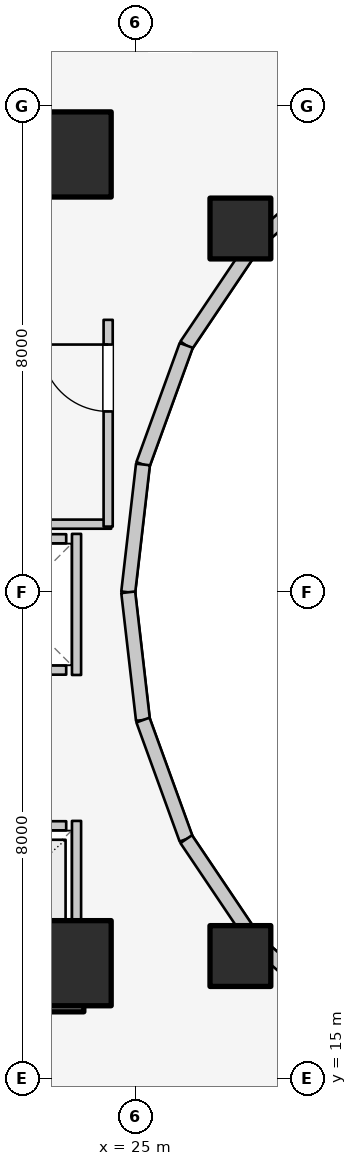
"""IFC4 building model, lengths in metres.
Left out: names, types, materials, properties, quantities, classifications, styles, units other than length and angle.
Written with IfcOpenShell. Run it as: python <this file> out.ifc"""

import sys

from ifc_helpers import new_model, si_unit, direction, frame, frame_2d, origin, origin_2d, place, context, subcontext, project, spatial, rectangle, extrude, element, fill, save


model = new_model("IFC4")
c1 = context("Model", 3, precision=1e-05, world=origin(), true_north=direction((0.0, 1.0)))
c2 = subcontext(c1, "Body", "Model", "MODEL_VIEW")
j1 = project(units=[si_unit("LENGTHUNIT", "METRE"), si_unit("PLANEANGLEUNIT", "RADIAN")], contexts=[c1])
p1 = place(None, origin())
s1 = spatial("IfcSite", under=j1, at=p1, CompositionType="ELEMENT")
p2 = place(p1, origin())
s2 = spatial("IfcBuilding", under=s1, at=p2, CompositionType="ELEMENT")
p3 = place(p2, frame((0.0, 0.0, 43.1)))
s3 = spatial("IfcBuildingStorey", under=s2, at=p3, CompositionType="ELEMENT", Elevation=43.1)
for number, where, z_axis, x_axis in (
    (1, (19.65, 16.55, 0.0), (0.0, 0.0, 1.0), (1.0, 0.0, 0.0)),
    (2, (19.65, 30.35, 0.0), (0.0, 0.0, 1.0), (1.0, 0.0, 0.0)),
):
    element("IfcWall", number, at=place(p3, frame(where, z_axis=z_axis, x_axis=x_axis)), inside=s3, PredefinedType="SHEAR", context=c2, shape_type="SweptSolid", body=[
        extrude(rectangle(XDim=4.5, YDim=0.9, at=frame_2d((2.25, 0.0))), origin(), (0.0, 0.0, 1.0), 3.1),
    ])
for number, where, z_axis, x_axis in (
    (3, (23.9, 16.9, 0.0), (0.0, 0.0, 1.0), (1.0, 0.0, 0.0)),
    (4, (23.9, 30.2, 0.0), (0.0, 0.0, 1.0), (1.0, 0.0, 0.0)),
):
    element("IfcColumn", number, at=place(p3, frame(where, z_axis=z_axis, x_axis=x_axis)), inside=s3, PredefinedType="COLUMN", context=c2, shape_type="SweptSolid", body=[
        extrude(rectangle(XDim=1.4, YDim=1.4, at=origin_2d()), origin(), (0.0, 0.0, 1.0), 3.1),
    ])
for number, where, z_axis, x_axis in (
    (5, (26.725, 28.982, 0.0), (0.0, 0.0, 1.0), (1.0, 0.0, 0.0)),
    (6, (26.725, 17.018, 0.0), (0.0, 0.0, 1.0), (1.0, 0.0, 0.0)),
):
    element("IfcColumn", number, at=place(p3, frame(where, z_axis=z_axis, x_axis=x_axis)), inside=s3, PredefinedType="COLUMN", context=c2, shape_type="SweptSolid", body=[
        extrude(rectangle(XDim=1.0, YDim=1.0, at=origin_2d()), origin(), (0.0, 0.0, 1.0), 3.1),
    ])
p4 = place(p3, frame((28.44, 30.032, 0.0), z_axis=(0.0, 0.0, 1.0), x_axis=(-0.752576694707, -0.658504607869, 0.0)))
e7 = element("IfcWall", 7, at=p4, inside=s3, PredefinedType="STANDARD", context=c2, shape_type="SweptSolid", body=[
    extrude(rectangle(XDim=1.959, YDim=0.23, at=frame_2d((0.98, 0.0))), origin(), (0.0, 0.0, 1.0), 1.22),
])
p5 = place(p3, frame((26.965, 28.742, 0.0), z_axis=(0.0, 0.0, 1.0), x_axis=(-0.558197800898, -0.829707909492, 0.0)))
e8 = element("IfcWall", 8, at=p5, inside=s3, PredefinedType="STANDARD", context=c2, shape_type="SweptSolid", body=[
    extrude(rectangle(XDim=2.027, YDim=0.23, at=frame_2d((1.013, 0.0))), origin(), (0.0, 0.0, 1.0), 1.22),
])
p6 = place(p3, frame((25.834, 27.06, 0.0), z_axis=(0.0, 0.0, 1.0), x_axis=(-0.341423187295, -0.93990968033, 0.0)))
e9 = element("IfcWall", 9, at=p6, inside=s3, PredefinedType="STANDARD", context=c2, shape_type="SweptSolid", body=[
    extrude(rectangle(XDim=2.084, YDim=0.23, at=frame_2d((1.042, 0.0))), origin(), (0.0, 0.0, 1.0), 2.56),
])
for number, where, z_axis, x_axis in (
    (10, (25.123, 25.102, 0.0), (0.0, 0.0, 1.0), (-0.115, -0.993, 0.0)),
    (11, (24.88, 23.0, 0.0), (0.0, 0.0, 1.0), (0.115, -0.993, 0.0)),
):
    element("IfcWall", number, at=place(p3, frame(where, z_axis=z_axis, x_axis=x_axis)), inside=s3, PredefinedType="STANDARD", context=c2, shape_type="SweptSolid", body=[
        extrude(rectangle(XDim=2.115, YDim=0.23, at=frame_2d((1.058, 0.0))), origin(), (0.0, 0.0, 1.0), 2.56),
    ])
p7 = place(p3, frame((25.123, 20.898, 0.0), z_axis=(0.0, 0.0, 1.0), x_axis=(0.341423187295, -0.93990968033, 0.0)))
e12 = element("IfcWall", 12, at=p7, inside=s3, PredefinedType="STANDARD", context=c2, shape_type="SweptSolid", body=[
    extrude(rectangle(XDim=2.084, YDim=0.23, at=frame_2d((1.042, 0.0))), origin(), (0.0, 0.0, 1.0), 2.56),
])
p8 = place(p3, frame((25.834, 18.94, 0.0), z_axis=(0.0, 0.0, 1.0), x_axis=(0.558197800898, -0.829707909492, 0.0)))
e13 = element("IfcWall", 13, at=p8, inside=s3, PredefinedType="STANDARD", context=c2, shape_type="SweptSolid", body=[
    extrude(rectangle(XDim=2.027, YDim=0.23, at=frame_2d((1.013, 0.0))), origin(), (0.0, 0.0, 1.0), 1.22),
])
p9 = place(p3, frame((26.965, 17.258, 0.0), z_axis=(0.0, 0.0, 1.0), x_axis=(0.752576694707, -0.658504607869, 0.0)))
e14 = element("IfcWall", 14, at=p9, inside=s3, PredefinedType="STANDARD", context=c2, shape_type="SweptSolid", body=[
    extrude(rectangle(XDim=1.959, YDim=0.23, at=frame_2d((0.98, 0.0))), origin(), (0.0, 0.0, 1.0), 1.22),
])
p10 = place(p3, frame((22.04, 19.16, 0.0), z_axis=(0.0, 0.0, 1.0), x_axis=(1.0, 0.0, 0.0)))
e15 = element("IfcWall", 15, at=p10, inside=s3, PredefinedType="SOLIDWALL", context=c2, shape_type="SweptSolid", body=[
    extrude(rectangle(XDim=1.82, YDim=0.15, at=frame_2d((0.91, 0.0))), origin(), (0.0, 0.0, 1.0), 2.12),
])
p11 = place(p10, frame((0.36, 0.0, 0.0)))
e16 = element("IfcOpeningElement", 16, at=p11, cuts=e15, PredefinedType="OPENING", context=c2, shape_type="SweptSolid", body=[
    extrude(rectangle(XDim=1.1, YDim=2.1, at=frame_2d((0.55, 1.05))), frame((0.0, 0.085, 0.0), z_axis=(0.0, -1.0, 0.0), x_axis=(1.0, 0.0, 0.0)), (0.0, 0.0, 1.0), 0.17),
])
p12 = place(p3, frame((22.04, 17.1, 0.0), z_axis=(0.0, 0.0, 1.0), x_axis=(1.0, 0.0, 0.0)))
e17 = element("IfcWall", 17, at=p12, inside=s3, PredefinedType="SOLIDWALL", context=c2, shape_type="SweptSolid", body=[
    extrude(rectangle(XDim=1.82, YDim=0.15, at=frame_2d((0.91, 0.0))), origin(), (0.0, 0.0, 1.0), 2.12),
])
p13 = place(p3, frame((24.03, 17.02, 0.0), z_axis=(0.0, 0.0, 1.0), x_axis=(0.0, 1.0, 0.0)))
e18 = element("IfcWall", 18, at=p13, inside=s3, PredefinedType="SOLIDWALL", context=c2, shape_type="SweptSolid", body=[
    extrude(rectangle(XDim=2.22, YDim=0.15, at=frame_2d((1.11, 0.0))), origin(), (0.0, 0.0, 1.0), 1.873),
])
for number, where, z_axis, x_axis in (
    (19, (22.04, 21.72, 0.0), (0.0, 0.0, 1.0), (1.0, 0.0, 0.0)),
    (20, (22.04, 23.88, 0.0), (0.0, 0.0, 1.0), (1.0, 0.0, 0.0)),
):
    element("IfcWall", number, at=place(p3, frame(where, z_axis=z_axis, x_axis=x_axis)), inside=s3, PredefinedType="SOLIDWALL", context=c2, shape_type="SweptSolid", body=[
        extrude(rectangle(XDim=1.82, YDim=0.15, at=frame_2d((0.91, 0.0))), origin(), (0.0, 0.0, 1.0), 2.12),
    ])
p14 = place(p3, frame((24.03, 21.64, 0.0), z_axis=(0.0, 0.0, 1.0), x_axis=(0.0, 1.0, 0.0)))
e21 = element("IfcWall", 21, at=p14, inside=s3, PredefinedType="SOLIDWALL", context=c2, shape_type="SweptSolid", body=[
    extrude(rectangle(XDim=2.32, YDim=0.15, at=frame_2d((1.16, 0.0))), origin(), (0.0, 0.0, 1.0), 2.12),
])
p15 = place(p3, frame((19.52, 24.12, 0.0), z_axis=(0.0, 0.0, 1.0), x_axis=(1.0, 0.0, 0.0)))
e22 = element("IfcWall", 22, at=p15, inside=s3, PredefinedType="PARTITIONING", context=c2, shape_type="SweptSolid", body=[
    extrude(rectangle(XDim=5.08, YDim=0.15, at=frame_2d((2.54, 0.0))), origin(), (0.0, 0.0, 1.0), 2.12),
])
p16 = place(p3, frame((24.55, 24.08, 0.0), z_axis=(0.0, 0.0, 1.0), x_axis=(0.0, 1.0, 0.0)))
e23 = element("IfcWall", 23, at=p16, inside=s3, PredefinedType="PARTITIONING", context=c2, shape_type="SweptSolid", body=[
    extrude(rectangle(XDim=3.4, YDim=0.15, at=frame_2d((1.7, 0.0))), origin(), (0.0, 0.0, 1.0), 2.575),
])
p17 = place(p16, frame((1.894, 0.0, 0.0)))
e24 = element("IfcOpeningElement", 24, at=p17, cuts=e23, PredefinedType="OPENING", context=c2, shape_type="SweptSolid", body=[
    extrude(rectangle(XDim=1.1, YDim=2.1, at=frame_2d((0.55, 1.05))), frame((0.0, 0.085, 0.0), z_axis=(0.0, -1.0, 0.0), x_axis=(1.0, 0.0, 0.0)), (0.0, 0.0, 1.0), 0.17),
])
p18 = place(p17, origin())
e25 = element("IfcDoor", 25, at=p18, inside=s3, OperationType="SINGLE_SWING_RIGHT", PredefinedType="DOOR", context=c2, shape_type="SweptSolid", body=[
    extrude(rectangle(XDim=1.1, YDim=2.1, at=frame_2d((0.55, 1.05))), frame((0.0, 0.025, 0.0), z_axis=(0.0, -1.0, 0.0), x_axis=(1.0, 0.0, 0.0)), (0.0, 0.0, 1.0), 0.05),
])
fill(e24, e25)
save(model, sys.argv[1])
